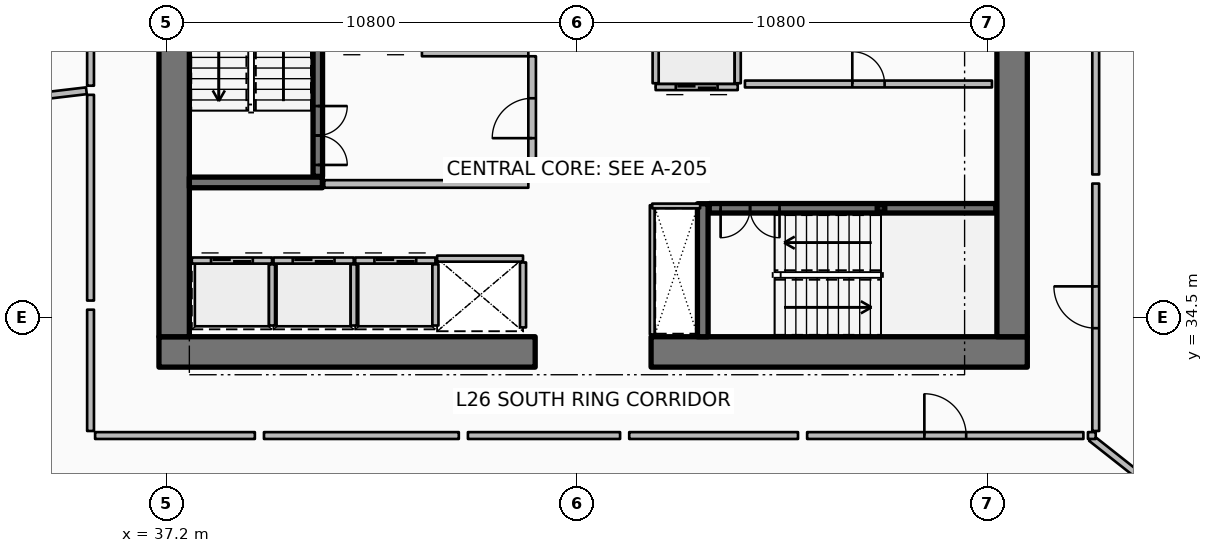
"""IFC4 building model, lengths in metres.
Left out: names, types, materials, properties, quantities, classifications, styles, units other than length and angle.
Written with IfcOpenShell. Run it as: python <this file> out.ifc"""

import sys

from ifc_helpers import new_model, si_unit, direction, frame, frame_2d, origin, origin_2d, place, context, subcontext, project, spatial, rectangle, hollow_rectangle, extrude, element, fill, save


model = new_model("IFC4")
c1 = context("Model", 3, precision=1e-05, world=origin(), true_north=direction((0.0, 1.0)))
c2 = subcontext(c1, "Body", "Model", "MODEL_VIEW")
j1 = project(units=[si_unit("LENGTHUNIT", "METRE"), si_unit("PLANEANGLEUNIT", "RADIAN")], contexts=[c1])
p1 = place(None, origin())
s1 = spatial("IfcSite", under=j1, at=p1, CompositionType="ELEMENT")
p2 = place(p1, origin())
s2 = spatial("IfcBuilding", under=s1, at=p2, CompositionType="ELEMENT")
p3 = place(p2, frame((0.0, 0.0, 105.15)))
s3 = spatial("IfcBuildingStorey", under=s2, at=p3, CompositionType="ELEMENT", Elevation=105.15)
p4 = place(p3, frame((37.0, 33.6, 0.0), z_axis=(0.0, 0.0, 1.0), x_axis=(1.0, 0.0, 0.0)))
e1 = element("IfcWall", 1, at=p4, inside=s3, PredefinedType="SHEAR", context=c2, shape_type="SweptSolid", body=[
    extrude(rectangle(XDim=9.9, YDim=0.8, at=frame_2d((4.95, 0.0))), origin(), (0.0, 0.0, 1.0), 3.75),
])
p5 = place(p3, frame((49.95, 33.6, 0.0), z_axis=(0.0, 0.0, 1.0), x_axis=(1.0, 0.0, 0.0)))
e2 = element("IfcWall", 2, at=p5, inside=s3, PredefinedType="SHEAR", context=c2, shape_type="SweptSolid", body=[
    extrude(rectangle(XDim=9.9, YDim=0.8, at=frame_2d((4.95, 0.0))), origin(), (0.0, 0.0, 1.0), 3.75),
])
for number, where, z_axis, x_axis in (
    (3, (37.4, 34.0, 0.0), (0.0, 0.0, 1.0), (0.0, 1.0, 0.0)),
    (4, (59.45, 34.0, 0.0), (0.0, 0.0, 1.0), (0.0, 1.0, 0.0)),
):
    element("IfcWall", number, at=place(p3, frame(where, z_axis=z_axis, x_axis=x_axis)), inside=s3, PredefinedType="SHEAR", context=c2, shape_type="SweptSolid", body=[
        extrude(rectangle(XDim=16.0, YDim=0.8, at=frame_2d((8.0, 0.0))), origin(), (0.0, 0.0, 1.0), 3.75),
    ])
for number, where, z_axis, x_axis in (
    (5, (37.8, 38.06, 0.0), (0.0, 0.0, 1.0), (1.0, 0.0, 0.0)),
    (6, (51.31, 34.0, 0.0), (0.0, 0.0, 1.0), (0.0, 1.0, 0.0)),
):
    element("IfcWall", number, at=place(p3, frame(where, z_axis=z_axis, x_axis=x_axis)), inside=s3, PredefinedType="SHEAR", context=c2, shape_type="SweptSolid", body=[
        extrude(rectangle(XDim=3.5, YDim=0.28, at=frame_2d((1.75, 0.0))), origin(), (0.0, 0.0, 1.0), 3.75),
    ])
p6 = place(p3, frame((56.0, 37.38, 0.0), z_axis=(0.0, 0.0, 1.0), x_axis=(1.0, 0.0, 0.0)))
e7 = element("IfcColumn", 7, at=p6, inside=s3, PredefinedType="COLUMN", context=c2, shape_type="SweptSolid", body=[
    extrude(hollow_rectangle(XDim=0.2, YDim=0.2, WallThickness=0.01, InnerFilletRadius=0.01, OuterFilletRadius=0.02, at=origin_2d()), origin(), (0.0, 0.0, 1.0), 1.67),
])
p7 = place(p3, frame((41.18, 38.22, 0.0), z_axis=(0.0, 0.0, 1.0), x_axis=(0.0, 1.0, 0.0)))
e8 = element("IfcWall", 8, at=p7, inside=s3, PredefinedType="SOLIDWALL", context=c2, shape_type="SweptSolid", body=[
    extrude(rectangle(XDim=7.56, YDim=0.25, at=frame_2d((3.78, 0.0))), origin(), (0.0, 0.0, 1.0), 3.5),
])
p8 = place(p7, frame((0.3, 0.0, 0.0)))
e9 = element("IfcOpeningElement", 9, at=p8, cuts=e8, PredefinedType="OPENING", context=c2, shape_type="SweptSolid", body=[
    extrude(rectangle(XDim=1.55, YDim=2.15, at=frame_2d((0.775, 1.075))), frame((0.0, 0.135, 0.0), z_axis=(0.0, -1.0, 0.0), x_axis=(1.0, 0.0, 0.0)), (0.0, 0.0, 1.0), 0.27),
])
p9 = place(p3, frame((51.48, 37.38, 0.0), z_axis=(0.0, 0.0, 1.0), x_axis=(1.0, 0.0, 0.0)))
e10 = element("IfcWall", 10, at=p9, inside=s3, PredefinedType="SOLIDWALL", context=c2, shape_type="SweptSolid", body=[
    extrude(rectangle(XDim=7.54, YDim=0.25, at=frame_2d((3.77, 0.0))), origin(), (0.0, 0.0, 1.0), 3.5),
])
p10 = place(p9, frame((0.3, 0.0, 0.0)))
e11 = element("IfcOpeningElement", 11, at=p10, cuts=e10, PredefinedType="OPENING", context=c2, shape_type="SweptSolid", body=[
    extrude(rectangle(XDim=1.55, YDim=2.15, at=frame_2d((0.775, 1.075))), frame((0.0, 0.135, 0.0), z_axis=(0.0, -1.0, 0.0), x_axis=(1.0, 0.0, 0.0)), (0.0, 0.0, 1.0), 0.27),
])
p11 = place(p3, frame((37.865, 36.005, 0.0), z_axis=(0.0, 0.0, 1.0), x_axis=(1.0, 0.0, 0.0)))
e12 = element("IfcWall", 12, at=p11, inside=s3, PredefinedType="PARTITIONING", context=c2, shape_type="SweptSolid", body=[
    extrude(rectangle(XDim=2.11, YDim=0.16, at=frame_2d((1.055, 0.0))), origin(), (0.0, 0.0, 1.0), 3.5),
])
p12 = place(p11, frame((0.505, 0.0, 0.0)))
e13 = element("IfcOpeningElement", 13, at=p12, cuts=e12, PredefinedType="OPENING", context=c2, shape_type="SweptSolid", body=[
    extrude(rectangle(XDim=1.1, YDim=2.1, at=frame_2d((0.55, 1.05))), frame((0.0, 0.09, 0.0), z_axis=(0.0, -1.0, 0.0), x_axis=(1.0, 0.0, 0.0)), (0.0, 0.0, 1.0), 0.18),
])
p13 = place(p3, frame((39.975, 34.295, 0.0), z_axis=(0.0, 0.0, 1.0), x_axis=(0.0, 1.0, 0.0)))
e14 = element("IfcWall", 14, at=p13, inside=s3, PredefinedType="PARTITIONING", context=c2, shape_type="SweptSolid", body=[
    extrude(rectangle(XDim=1.61, YDim=0.16, at=frame_2d((0.805, 0.0))), origin(), (0.0, 0.0, 1.0), 3.5),
])
p14 = place(p3, frame((40.015, 36.005, 0.0), z_axis=(0.0, 0.0, 1.0), x_axis=(1.0, 0.0, 0.0)))
e15 = element("IfcWall", 15, at=p14, inside=s3, PredefinedType="PARTITIONING", context=c2, shape_type="SweptSolid", body=[
    extrude(rectangle(XDim=2.11, YDim=0.16, at=frame_2d((1.055, 0.0))), origin(), (0.0, 0.0, 1.0), 3.5),
])
p15 = place(p14, frame((0.505, 0.0, 0.0)))
e16 = element("IfcOpeningElement", 16, at=p15, cuts=e15, PredefinedType="OPENING", context=c2, shape_type="SweptSolid", body=[
    extrude(rectangle(XDim=1.1, YDim=2.1, at=frame_2d((0.55, 1.05))), frame((0.0, 0.09, 0.0), z_axis=(0.0, -1.0, 0.0), x_axis=(1.0, 0.0, 0.0)), (0.0, 0.0, 1.0), 0.18),
])
p16 = place(p3, frame((42.125, 34.295, 0.0), z_axis=(0.0, 0.0, 1.0), x_axis=(0.0, 1.0, 0.0)))
e17 = element("IfcWall", 17, at=p16, inside=s3, PredefinedType="PARTITIONING", context=c2, shape_type="SweptSolid", body=[
    extrude(rectangle(XDim=1.61, YDim=0.16, at=frame_2d((0.805, 0.0))), origin(), (0.0, 0.0, 1.0), 3.5),
])
p17 = place(p3, frame((42.165, 36.005, 0.0), z_axis=(0.0, 0.0, 1.0), x_axis=(1.0, 0.0, 0.0)))
e18 = element("IfcWall", 18, at=p17, inside=s3, PredefinedType="PARTITIONING", context=c2, shape_type="SweptSolid", body=[
    extrude(rectangle(XDim=2.11, YDim=0.16, at=frame_2d((1.055, 0.0))), origin(), (0.0, 0.0, 1.0), 3.5),
])
p18 = place(p17, frame((0.505, 0.0, 0.0)))
e19 = element("IfcOpeningElement", 19, at=p18, cuts=e18, PredefinedType="OPENING", context=c2, shape_type="SweptSolid", body=[
    extrude(rectangle(XDim=1.1, YDim=2.1, at=frame_2d((0.55, 1.05))), frame((0.0, 0.09, 0.0), z_axis=(0.0, -1.0, 0.0), x_axis=(1.0, 0.0, 0.0)), (0.0, 0.0, 1.0), 0.18),
])
p19 = place(p3, frame((44.275, 34.295, 0.0), z_axis=(0.0, 0.0, 1.0), x_axis=(0.0, 1.0, 0.0)))
e20 = element("IfcWall", 20, at=p19, inside=s3, PredefinedType="PARTITIONING", context=c2, shape_type="SweptSolid", body=[
    extrude(rectangle(XDim=1.61, YDim=0.16, at=frame_2d((0.805, 0.0))), origin(), (0.0, 0.0, 1.0), 3.5),
])
p20 = place(p3, frame((44.32, 36.055, 0.0), z_axis=(0.0, 0.0, 1.0), x_axis=(1.0, 0.0, 0.0)))
e21 = element("IfcWall", 21, at=p20, inside=s3, PredefinedType="PARTITIONING", context=c2, shape_type="SweptSolid", body=[
    extrude(rectangle(XDim=2.26, YDim=0.16, at=frame_2d((1.13, 0.0))), origin(), (0.0, 0.0, 1.0), 3.5),
])
p21 = place(p3, frame((46.58, 34.245, 0.0), z_axis=(0.0, 0.0, 1.0), x_axis=(0.0, 1.0, 0.0)))
e22 = element("IfcWall", 22, at=p21, inside=s3, PredefinedType="PARTITIONING", context=c2, shape_type="SweptSolid", body=[
    extrude(rectangle(XDim=1.71, YDim=0.16, at=frame_2d((0.855, 0.0))), origin(), (0.0, 0.0, 1.0), 3.5),
])
p22 = place(p3, frame((52.23, 40.57, 0.0), z_axis=(0.0, 0.0, 1.0), x_axis=(-1.0, 0.0, 0.0)))
e23 = element("IfcWall", 23, at=p22, inside=s3, PredefinedType="PARTITIONING", context=c2, shape_type="SweptSolid", body=[
    extrude(rectangle(XDim=2.16, YDim=0.16, at=frame_2d((1.08, 0.0))), origin(), (0.0, 0.0, 1.0), 3.5),
])
p23 = place(p22, frame((0.53, 0.0, 0.0)))
e24 = element("IfcOpeningElement", 24, at=p23, cuts=e23, PredefinedType="OPENING", context=c2, shape_type="SweptSolid", body=[
    extrude(rectangle(XDim=1.1, YDim=2.1, at=frame_2d((0.55, 1.05))), frame((0.0, 0.09, 0.0), z_axis=(0.0, -1.0, 0.0), x_axis=(1.0, 0.0, 0.0)), (0.0, 0.0, 1.0), 0.18),
])
for number, where, z_axis, x_axis in (
    (25, (52.23, 40.67, 0.0), (0.0, 0.0, 1.0), (0.0, 1.0, 0.0)),
    (26, (50.07, 40.67, 0.0), (0.0, 0.0, 1.0), (0.0, 1.0, 0.0)),
):
    element("IfcWall", number, at=place(p3, frame(where, z_axis=z_axis, x_axis=x_axis)), inside=s3, PredefinedType="PARTITIONING", context=c2, shape_type="SweptSolid", body=[
        extrude(rectangle(XDim=2.16, YDim=0.16, at=frame_2d((1.08, 0.0))), origin(), (0.0, 0.0, 1.0), 3.5),
    ])
p24 = place(p3, frame((52.42, 40.65, 0.0), z_axis=(0.0, 0.0, 1.0), x_axis=(1.0, 0.0, 0.0)))
e27 = element("IfcWall", 27, at=p24, inside=s3, PredefinedType="PARTITIONING", context=c2, shape_type="SweptSolid", body=[
    extrude(rectangle(XDim=6.5, YDim=0.18, at=frame_2d((3.25, 0.0))), origin(), (0.0, 0.0, 1.0), 3.5),
])
p25 = place(p24, frame((2.825, 0.0, 0.0)))
e28 = element("IfcOpeningElement", 28, at=p25, cuts=e27, PredefinedType="OPENING", context=c2, shape_type="SweptSolid", body=[
    extrude(rectangle(XDim=0.85, YDim=2.06, at=frame_2d((0.425, 1.03))), frame((0.0, 0.1, 0.0), z_axis=(0.0, -1.0, 0.0), x_axis=(1.0, 0.0, 0.0)), (0.0, 0.0, 1.0), 0.2),
])
p26 = place(p3, frame((41.35, 38.02, 0.0), z_axis=(0.0, 0.0, 1.0), x_axis=(1.0, 0.0, 0.0)))
e29 = element("IfcWall", 29, at=p26, inside=s3, PredefinedType="PARTITIONING", context=c2, shape_type="SweptSolid", body=[
    extrude(rectangle(XDim=5.37, YDim=0.2, at=frame_2d((2.685, 0.0))), origin(), (0.0, 0.0, 1.0), 3.5),
])
p27 = place(p3, frame((43.92, 41.48, 0.0), z_axis=(0.0, 0.0, 1.0), x_axis=(1.0, 0.0, 0.0)))
e30 = element("IfcWall", 30, at=p27, inside=s3, PredefinedType="PARTITIONING", context=c2, shape_type="SweptSolid", body=[
    extrude(rectangle(XDim=2.8, YDim=0.2, at=frame_2d((1.4, 0.0))), origin(), (0.0, 0.0, 1.0), 3.5),
])
p28 = place(p3, frame((46.82, 38.12, 0.0), z_axis=(0.0, 0.0, 1.0), x_axis=(0.0, 1.0, 0.0)))
e31 = element("IfcWall", 31, at=p28, inside=s3, PredefinedType="PARTITIONING", context=c2, shape_type="SweptSolid", body=[
    extrude(rectangle(XDim=3.26, YDim=0.2, at=frame_2d((1.63, 0.0))), origin(), (0.0, 0.0, 1.0), 3.5),
])
p29 = place(p28, frame((1.105, 0.0, 0.0)))
e32 = element("IfcOpeningElement", 32, at=p29, cuts=e31, PredefinedType="OPENING", context=c2, shape_type="SweptSolid", body=[
    extrude(rectangle(XDim=1.05, YDim=2.1, at=frame_2d((0.525, 1.05))), frame((0.0, 0.11, 0.0), z_axis=(0.0, -1.0, 0.0), x_axis=(1.0, 0.0, 0.0)), (0.0, 0.0, 1.0), 0.22),
])
p30 = place(p3, frame((49.98, 34.06, 0.0), z_axis=(0.0, 0.0, 1.0), x_axis=(0.0, 1.0, 0.0)))
e33 = element("IfcWall", 33, at=p30, inside=s3, PredefinedType="PARTITIONING", context=c2, shape_type="SweptSolid", body=[
    extrude(rectangle(XDim=3.4, YDim=0.125, at=frame_2d((1.7, 0.0))), origin(), (0.0, 0.0, 1.0), 2.94),
])
p31 = place(p3, frame((49.98, 37.44, 0.0), z_axis=(0.0, 0.0, 1.0), x_axis=(1.0, 0.0, 0.0)))
e34 = element("IfcWall", 34, at=p31, inside=s3, PredefinedType="PARTITIONING", context=c2, shape_type="SweptSolid", body=[
    extrude(rectangle(XDim=1.26, YDim=0.125, at=frame_2d((0.63, 0.0))), origin(), (0.0, 0.0, 1.0), 2.94),
])
p32 = place(p3, frame((35.091, 40.472, 0.0), z_axis=(0.0, 0.0, 1.0), x_axis=(-0.99306845132, -0.117537445069, 0.0)))
e35 = element("IfcWall", 35, at=p32, inside=s3, PredefinedType="PARTITIONING", context=c2, shape_type="SweptSolid", body=[
    extrude(rectangle(XDim=16.48, YDim=0.18, at=frame_2d((8.24, 0.0))), origin(), (0.0, 0.0, 1.0), 2.94),
])
p33 = place(p3, frame((61.532, 31.332, 0.0), z_axis=(0.0, 0.0, 1.0), x_axis=(0.785307944478, -0.619105348337, 0.0)))
e36 = element("IfcWall", 36, at=p33, inside=s3, PredefinedType="PARTITIONING", context=c2, shape_type="SweptSolid", body=[
    extrude(rectangle(XDim=9.006, YDim=0.18, at=frame_2d((4.503, 0.0))), origin(), (0.0, 0.0, 1.0), 2.94),
])
p34 = place(p3, frame((35.2, 45.49, 0.0), z_axis=(0.0, 0.0, 1.0), x_axis=(0.0, -1.0, 0.0)))
e37 = element("IfcWall", 37, at=p34, inside=s3, PredefinedType="PARTITIONING", context=c2, shape_type="SweptSolid", body=[
    extrude(rectangle(XDim=4.885, YDim=0.18, at=frame_2d((2.442, 0.0))), origin(), (0.0, 0.0, 1.0), 2.94),
])
p35 = place(p3, frame((54.056, 31.4, 0.0), z_axis=(0.0, 0.0, 1.0), x_axis=(1.0, 0.0, 0.0)))
e38 = element("IfcWall", 38, at=p35, inside=s3, PredefinedType="PARTITIONING", context=c2, shape_type="SweptSolid", body=[
    extrude(rectangle(XDim=7.27, YDim=0.18, at=frame_2d((3.635, 0.0))), origin(), (0.0, 0.0, 1.0), 2.94),
])
p36 = place(p35, frame((3.085, 0.0, 0.0)))
e39 = element("IfcOpeningElement", 39, at=p36, cuts=e38, PredefinedType="OPENING", context=c2, shape_type="SweptSolid", body=[
    extrude(rectangle(XDim=1.1, YDim=2.1, at=frame_2d((0.55, 1.05))), frame((0.0, 0.1, 0.0), z_axis=(0.0, -1.0, 0.0), x_axis=(1.0, 0.0, 0.0)), (0.0, 0.0, 1.0), 0.2),
])
p37 = place(p3, frame((35.2, 40.365, 0.0), z_axis=(0.0, 0.0, 1.0), x_axis=(0.0, -1.0, 0.0)))
e40 = element("IfcWall", 40, at=p37, inside=s3, PredefinedType="PARTITIONING", context=c2, shape_type="SweptSolid", body=[
    extrude(rectangle(XDim=5.413, YDim=0.18, at=frame_2d((2.707, 0.0))), origin(), (0.0, 0.0, 1.0), 2.94),
])
p38 = place(p3, frame((35.2, 34.712, 0.0), z_axis=(0.0, 0.0, 1.0), x_axis=(0.0, -1.0, 0.0)))
e41 = element("IfcWall", 41, at=p38, inside=s3, PredefinedType="PARTITIONING", context=c2, shape_type="SweptSolid", body=[
    extrude(rectangle(XDim=3.192, YDim=0.18, at=frame_2d((1.596, 0.0))), origin(), (0.0, 0.0, 1.0), 2.94),
])
p39 = place(p3, frame((35.32, 31.4, 0.0), z_axis=(0.0, 0.0, 1.0), x_axis=(1.0, 0.0, 0.0)))
e42 = element("IfcWall", 42, at=p39, inside=s3, PredefinedType="PARTITIONING", context=c2, shape_type="SweptSolid", body=[
    extrude(rectangle(XDim=4.204, YDim=0.18, at=frame_2d((2.102, 0.0))), origin(), (0.0, 0.0, 1.0), 2.94),
])
p40 = place(p3, frame((39.764, 31.4, 0.0), z_axis=(0.0, 0.0, 1.0), x_axis=(1.0, 0.0, 0.0)))
e43 = element("IfcWall", 43, at=p40, inside=s3, PredefinedType="PARTITIONING", context=c2, shape_type="SweptSolid", body=[
    extrude(rectangle(XDim=5.127, YDim=0.18, at=frame_2d((2.563, 0.0))), origin(), (0.0, 0.0, 1.0), 2.94),
])
p41 = place(p3, frame((45.131, 31.4, 0.0), z_axis=(0.0, 0.0, 1.0), x_axis=(1.0, 0.0, 0.0)))
e44 = element("IfcWall", 44, at=p41, inside=s3, PredefinedType="PARTITIONING", context=c2, shape_type="SweptSolid", body=[
    extrude(rectangle(XDim=4.004, YDim=0.18, at=frame_2d((2.002, 0.0))), origin(), (0.0, 0.0, 1.0), 2.94),
])
p42 = place(p3, frame((49.375, 31.4, 0.0), z_axis=(0.0, 0.0, 1.0), x_axis=(1.0, 0.0, 0.0)))
e45 = element("IfcWall", 45, at=p42, inside=s3, PredefinedType="PARTITIONING", context=c2, shape_type="SweptSolid", body=[
    extrude(rectangle(XDim=4.442, YDim=0.18, at=frame_2d((2.221, 0.0))), origin(), (0.0, 0.0, 1.0), 2.94),
])
p43 = place(p3, frame((61.446, 31.4, 0.0), z_axis=(0.0, 0.0, 1.0), x_axis=(1.0, 0.0, 0.0)))
e46 = element("IfcWall", 46, at=p43, inside=s3, PredefinedType="PARTITIONING", context=c2, shape_type="SweptSolid", body=[
    extrude(rectangle(XDim=0.204, YDim=0.18, at=frame_2d((0.102, 0.0))), origin(), (0.0, 0.0, 1.0), 2.94),
])
p44 = place(p3, frame((61.65, 31.52, 0.0), z_axis=(0.0, 0.0, 1.0), x_axis=(0.0, 1.0, 0.0)))
e47 = element("IfcWall", 47, at=p44, inside=s3, PredefinedType="PARTITIONING", context=c2, shape_type="SweptSolid", body=[
    extrude(rectangle(XDim=6.51, YDim=0.18, at=frame_2d((3.255, 0.0))), origin(), (0.0, 0.0, 1.0), 2.94),
])
p45 = place(p44, frame((2.705, 0.0, 0.0)))
e48 = element("IfcOpeningElement", 48, at=p45, cuts=e47, PredefinedType="OPENING", context=c2, shape_type="SweptSolid", body=[
    extrude(rectangle(XDim=1.1, YDim=2.1, at=frame_2d((0.55, 1.05))), frame((0.0, 0.1, 0.0), z_axis=(0.0, -1.0, 0.0), x_axis=(1.0, 0.0, 0.0)), (0.0, 0.0, 1.0), 0.2),
])
p46 = place(p3, frame((61.65, 38.27, 0.0), z_axis=(0.0, 0.0, 1.0), x_axis=(0.0, 1.0, 0.0)))
e49 = element("IfcWall", 49, at=p46, inside=s3, PredefinedType="PARTITIONING", context=c2, shape_type="SweptSolid", body=[
    extrude(rectangle(XDim=5.225, YDim=0.18, at=frame_2d((2.613, 0.0))), origin(), (0.0, 0.0, 1.0), 2.94),
])
p47 = place(p8, origin())
e50 = element("IfcDoor", 50, at=p47, inside=s3, OperationType="DOUBLE_DOOR_SINGLE_SWING", PredefinedType="DOOR", context=c2, shape_type="SweptSolid", body=[
    extrude(rectangle(XDim=1.55, YDim=2.15, at=frame_2d((0.775, 1.075))), frame((0.0, 0.025, 0.0), z_axis=(0.0, -1.0, 0.0), x_axis=(1.0, 0.0, 0.0)), (0.0, 0.0, 1.0), 0.05),
])
fill(e9, e50)
p48 = place(p10, origin())
e51 = element("IfcDoor", 51, at=p48, inside=s3, OperationType="DOUBLE_DOOR_SINGLE_SWING", PredefinedType="DOOR", context=c2, shape_type="SweptSolid", body=[
    extrude(rectangle(XDim=1.55, YDim=2.15, at=frame_2d((0.775, 1.075))), frame((0.0, 0.025, 0.0), z_axis=(0.0, -1.0, 0.0), x_axis=(1.0, 0.0, 0.0)), (0.0, 0.0, 1.0), 0.05),
])
fill(e11, e51)
p49 = place(p12, origin())
e52 = element("IfcDoor", 52, at=p49, inside=s3, OperationType="DOUBLE_DOOR_SLIDING", PredefinedType="DOOR", context=c2, shape_type="SweptSolid", body=[
    extrude(rectangle(XDim=1.1, YDim=2.1, at=frame_2d((0.55, 1.05))), frame((0.0, 0.025, 0.0), z_axis=(0.0, -1.0, 0.0), x_axis=(1.0, 0.0, 0.0)), (0.0, 0.0, 1.0), 0.05),
])
fill(e13, e52)
p50 = place(p15, origin())
e53 = element("IfcDoor", 53, at=p50, inside=s3, OperationType="DOUBLE_DOOR_SLIDING", PredefinedType="DOOR", context=c2, shape_type="SweptSolid", body=[
    extrude(rectangle(XDim=1.1, YDim=2.1, at=frame_2d((0.55, 1.05))), frame((0.0, 0.025, 0.0), z_axis=(0.0, -1.0, 0.0), x_axis=(1.0, 0.0, 0.0)), (0.0, 0.0, 1.0), 0.05),
])
fill(e16, e53)
p51 = place(p18, origin())
e54 = element("IfcDoor", 54, at=p51, inside=s3, OperationType="DOUBLE_DOOR_SLIDING", PredefinedType="DOOR", context=c2, shape_type="SweptSolid", body=[
    extrude(rectangle(XDim=1.1, YDim=2.1, at=frame_2d((0.55, 1.05))), frame((0.0, 0.025, 0.0), z_axis=(0.0, -1.0, 0.0), x_axis=(1.0, 0.0, 0.0)), (0.0, 0.0, 1.0), 0.05),
])
fill(e19, e54)
p52 = place(p23, origin())
e55 = element("IfcDoor", 55, at=p52, inside=s3, OperationType="DOUBLE_DOOR_SLIDING", PredefinedType="DOOR", context=c2, shape_type="SweptSolid", body=[
    extrude(rectangle(XDim=1.1, YDim=2.1, at=frame_2d((0.55, 1.05))), frame((0.0, 0.025, 0.0), z_axis=(0.0, -1.0, 0.0), x_axis=(1.0, 0.0, 0.0)), (0.0, 0.0, 1.0), 0.05),
])
fill(e24, e55)
p53 = place(p25, origin())
e56 = element("IfcDoor", 56, at=p53, inside=s3, OperationType="SINGLE_SWING_LEFT", PredefinedType="DOOR", context=c2, shape_type="SweptSolid", body=[
    extrude(rectangle(XDim=0.85, YDim=2.06, at=frame_2d((0.425, 1.03))), frame((0.0, 0.025, 0.0), z_axis=(0.0, -1.0, 0.0), x_axis=(1.0, 0.0, 0.0)), (0.0, 0.0, 1.0), 0.05),
])
fill(e28, e56)
p54 = place(p29, origin())
e57 = element("IfcDoor", 57, at=p54, inside=s3, OperationType="SINGLE_SWING_LEFT", PredefinedType="DOOR", context=c2, shape_type="SweptSolid", body=[
    extrude(rectangle(XDim=1.05, YDim=2.1, at=frame_2d((0.525, 1.05))), frame((0.0, 0.025, 0.0), z_axis=(0.0, -1.0, 0.0), x_axis=(1.0, 0.0, 0.0)), (0.0, 0.0, 1.0), 0.05),
])
fill(e32, e57)
p55 = place(p36, origin())
e58 = element("IfcDoor", 58, at=p55, inside=s3, OperationType="SINGLE_SWING_LEFT", PredefinedType="DOOR", context=c2, shape_type="SweptSolid", body=[
    extrude(rectangle(XDim=1.1, YDim=2.1, at=frame_2d((0.55, 1.05))), frame((0.0, 0.025, 0.0), z_axis=(0.0, -1.0, 0.0), x_axis=(1.0, 0.0, 0.0)), (0.0, 0.0, 1.0), 0.05),
])
fill(e39, e58)
p56 = place(p45, origin())
e59 = element("IfcDoor", 59, at=p56, inside=s3, OperationType="SINGLE_SWING_RIGHT", PredefinedType="DOOR", context=c2, shape_type="SweptSolid", body=[
    extrude(rectangle(XDim=1.1, YDim=2.1, at=frame_2d((0.55, 1.05))), frame((0.0, 0.025, 0.0), z_axis=(0.0, -1.0, 0.0), x_axis=(1.0, 0.0, 0.0)), (0.0, 0.0, 1.0), 0.05),
])
fill(e48, e59)
save(model, sys.argv[1])
